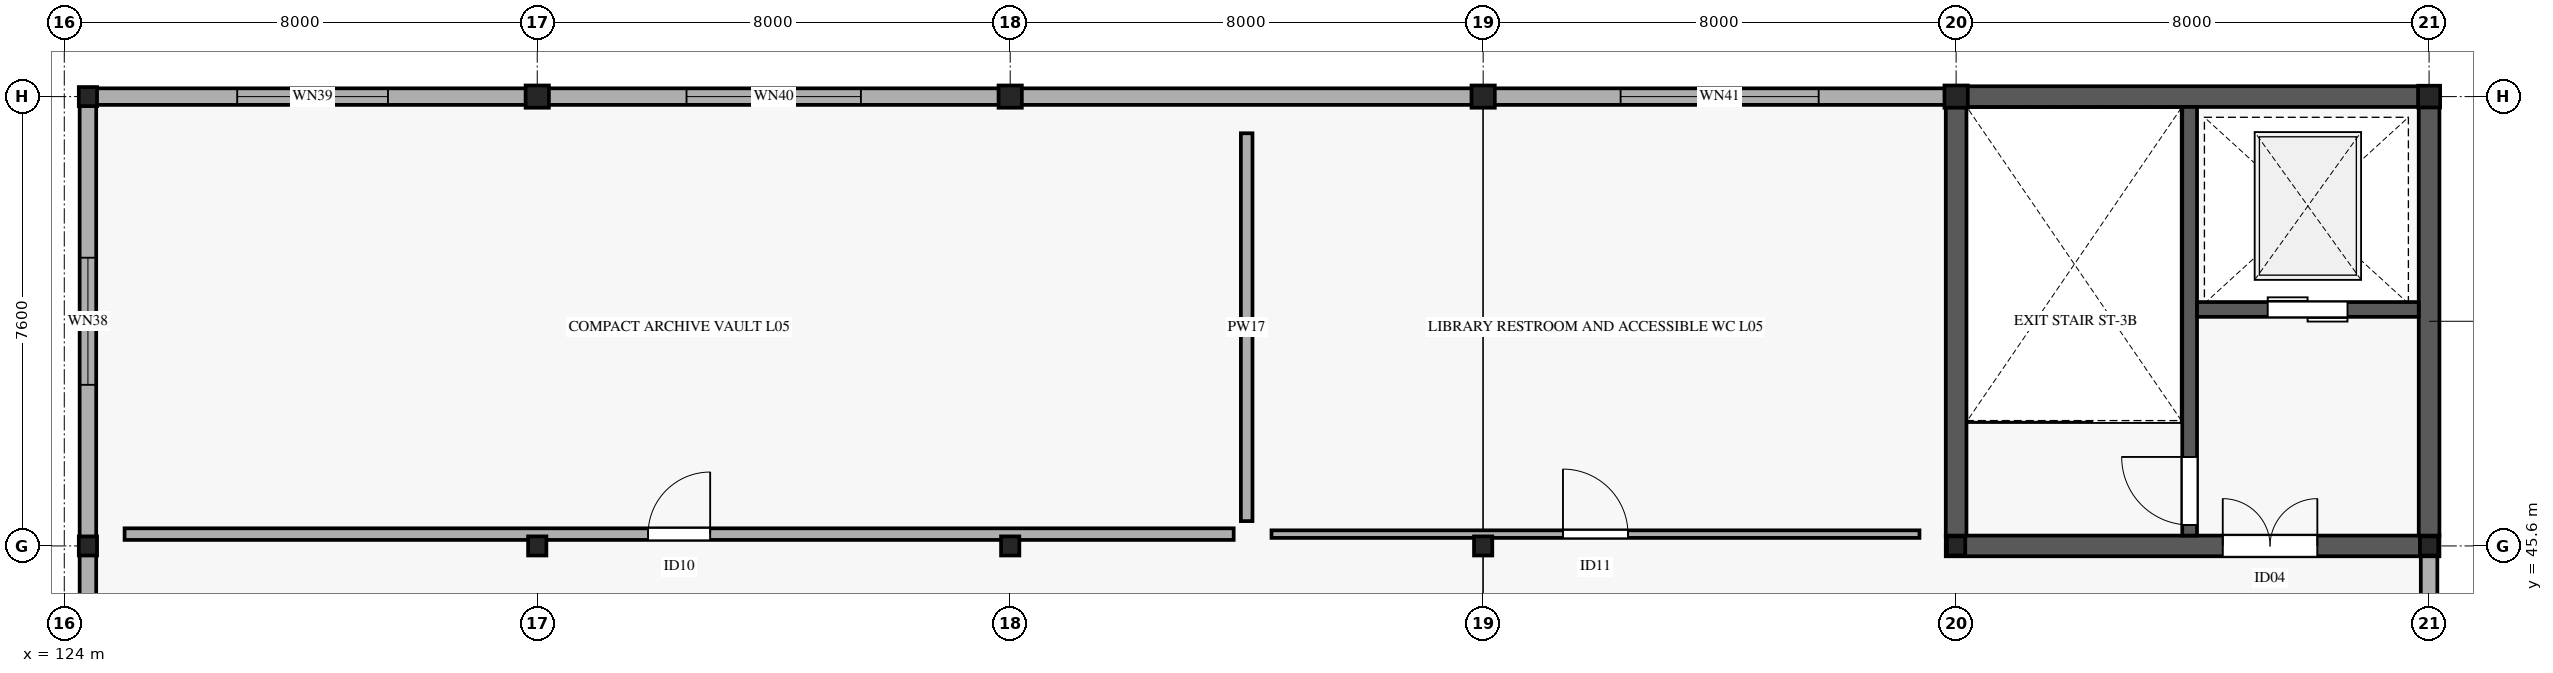
"""IFC4 building model, lengths in metres.
Left out: names, types, materials, properties, quantities, classifications, styles, units other than length and angle.
Written with IfcOpenShell. Run it as: python <this file> out.ifc"""

import sys

from ifc_helpers import new_model, si_unit, direction, frame, frame_2d, origin, origin_2d, place, context, subcontext, project, spatial, rectangle, i_section, extrude, element, fill, save


model = new_model("IFC4")
c1 = context("Model", 3, precision=1e-05, world=origin(), true_north=direction((0.0, 1.0)))
c2 = subcontext(c1, "Body", "Model", "MODEL_VIEW")
j1 = project(units=[si_unit("LENGTHUNIT", "METRE"), si_unit("PLANEANGLEUNIT", "RADIAN")], contexts=[c1])
p1 = place(None, origin())
s1 = spatial("IfcSite", under=j1, at=p1, CompositionType="ELEMENT")
p2 = place(p1, origin())
s2 = spatial("IfcBuilding", under=s1, at=p2, CompositionType="ELEMENT")
p3 = place(p2, frame((0.0, 0.0, 25.2)))
s3 = spatial("IfcBuildingStorey", under=s2, at=p3, CompositionType="ELEMENT", Elevation=25.2)
for number, where, z_axis, x_axis in (
    (1, (124.4, 45.6, 0.0), (0.0, 0.0, 1.0), (1.0, 0.0, 0.0)),
    (2, (124.4, 53.2, 0.0), (0.0, 0.0, 1.0), (1.0, 0.0, 0.0)),
    (3, (132.0, 45.6, 0.0), (0.0, 0.0, 1.0), (1.0, 0.0, 0.0)),
):
    element("IfcColumn", number, at=place(p3, frame(where, z_axis=z_axis, x_axis=x_axis)), inside=s3, PredefinedType="COLUMN", context=c2, shape_type="SweptSolid", body=[
        extrude(i_section(OverallWidth=0.309, OverallDepth=0.323, WebThickness=0.014, FlangeThickness=0.023, FilletRadius=0.015, at=origin_2d()), origin(), (0.0, 0.0, 1.0), 3.995),
    ])
p4 = place(p3, frame((132.0, 53.2, 0.0), z_axis=(0.0, 0.0, 1.0), x_axis=(1.0, 0.0, 0.0)))
e4 = element("IfcColumn", 4, at=p4, inside=s3, PredefinedType="COLUMN", context=c2, shape_type="SweptSolid", body=[
    extrude(i_section(OverallWidth=0.394, OverallDepth=0.376, WebThickness=0.017, FlangeThickness=0.028, FilletRadius=0.015, at=origin_2d()), origin(), (0.0, 0.0, 1.0), 3.995),
])
p5 = place(p3, frame((140.0, 45.6, 0.0), z_axis=(0.0, 0.0, 1.0), x_axis=(1.0, 0.0, 0.0)))
e5 = element("IfcColumn", 5, at=p5, inside=s3, PredefinedType="COLUMN", context=c2, shape_type="SweptSolid", body=[
    extrude(i_section(OverallWidth=0.309, OverallDepth=0.323, WebThickness=0.014, FlangeThickness=0.023, FilletRadius=0.015, at=origin_2d()), origin(), (0.0, 0.0, 1.0), 3.995),
])
p6 = place(p3, frame((140.0, 53.2, 0.0), z_axis=(0.0, 0.0, 1.0), x_axis=(1.0, 0.0, 0.0)))
e6 = element("IfcColumn", 6, at=p6, inside=s3, PredefinedType="COLUMN", context=c2, shape_type="SweptSolid", body=[
    extrude(i_section(OverallWidth=0.394, OverallDepth=0.376, WebThickness=0.017, FlangeThickness=0.028, FilletRadius=0.015, at=origin_2d()), origin(), (0.0, 0.0, 1.0), 3.995),
])
p7 = place(p3, frame((148.0, 45.6, 0.0), z_axis=(0.0, 0.0, 1.0), x_axis=(1.0, 0.0, 0.0)))
e7 = element("IfcColumn", 7, at=p7, inside=s3, PredefinedType="COLUMN", context=c2, shape_type="SweptSolid", body=[
    extrude(i_section(OverallWidth=0.309, OverallDepth=0.323, WebThickness=0.014, FlangeThickness=0.023, FilletRadius=0.015, at=origin_2d()), origin(), (0.0, 0.0, 1.0), 3.995),
])
p8 = place(p3, frame((148.0, 53.2, 0.0), z_axis=(0.0, 0.0, 1.0), x_axis=(1.0, 0.0, 0.0)))
e8 = element("IfcColumn", 8, at=p8, inside=s3, PredefinedType="COLUMN", context=c2, shape_type="SweptSolid", body=[
    extrude(i_section(OverallWidth=0.394, OverallDepth=0.376, WebThickness=0.017, FlangeThickness=0.028, FilletRadius=0.015, at=origin_2d()), origin(), (0.0, 0.0, 1.0), 3.995),
])
p9 = place(p3, frame((156.0, 45.6, 0.0), z_axis=(0.0, 0.0, 1.0), x_axis=(1.0, 0.0, 0.0)))
e9 = element("IfcColumn", 9, at=p9, inside=s3, PredefinedType="COLUMN", context=c2, shape_type="SweptSolid", body=[
    extrude(i_section(OverallWidth=0.309, OverallDepth=0.323, WebThickness=0.014, FlangeThickness=0.023, FilletRadius=0.015, at=origin_2d()), origin(), (0.0, 0.0, 1.0), 3.995),
])
p10 = place(p3, frame((156.0, 53.2, 0.0), z_axis=(0.0, 0.0, 1.0), x_axis=(1.0, 0.0, 0.0)))
e10 = element("IfcColumn", 10, at=p10, inside=s3, PredefinedType="COLUMN", context=c2, shape_type="SweptSolid", body=[
    extrude(i_section(OverallWidth=0.394, OverallDepth=0.376, WebThickness=0.017, FlangeThickness=0.028, FilletRadius=0.015, at=origin_2d()), origin(), (0.0, 0.0, 1.0), 3.995),
])
p11 = place(p3, frame((164.0, 45.6, 0.0), z_axis=(0.0, 0.0, 1.0), x_axis=(1.0, 0.0, 0.0)))
e11 = element("IfcColumn", 11, at=p11, inside=s3, PredefinedType="COLUMN", context=c2, shape_type="SweptSolid", body=[
    extrude(i_section(OverallWidth=0.309, OverallDepth=0.323, WebThickness=0.014, FlangeThickness=0.023, FilletRadius=0.015, at=origin_2d()), origin(), (0.0, 0.0, 1.0), 3.995),
])
p12 = place(p3, frame((164.0, 53.2, 0.0), z_axis=(0.0, 0.0, 1.0), x_axis=(1.0, 0.0, 0.0)))
e12 = element("IfcColumn", 12, at=p12, inside=s3, PredefinedType="COLUMN", context=c2, shape_type="SweptSolid", body=[
    extrude(i_section(OverallWidth=0.373, OverallDepth=0.368, WebThickness=0.015, FlangeThickness=0.024, FilletRadius=0.015, at=origin_2d()), origin(), (0.0, 0.0, 1.0), 3.995),
])
p13 = place(p3, frame((124.4, 37.98, 0.0), z_axis=(0.0, 0.0, 1.0), x_axis=(0.0, 1.0, 0.0)))
e13 = element("IfcWall", 13, at=p13, inside=s3, PredefinedType="STANDARD", context=c2, shape_type="SweptSolid", body=[
    extrude(rectangle(XDim=7.64, YDim=0.28, at=frame_2d((3.82, 0.0))), origin(), (0.0, 0.0, 1.0), 3.06),
])
p14 = place(p13, frame((2.895, 0.0, 0.75)))
e14 = element("IfcOpeningElement", 14, at=p14, cuts=e13, PredefinedType="OPENING", context=c2, shape_type="SweptSolid", body=[
    extrude(rectangle(XDim=1.85, YDim=1.9, at=frame_2d((0.925, 0.95))), frame((0.0, 0.15, 0.0), z_axis=(0.0, -1.0, 0.0), x_axis=(1.0, 0.0, 0.0)), (0.0, 0.0, 1.0), 0.3),
])
p15 = place(p3, frame((124.4, 45.58, 0.0), z_axis=(0.0, 0.0, 1.0), x_axis=(0.0, 1.0, 0.0)))
e15 = element("IfcWall", 15, at=p15, inside=s3, PredefinedType="STANDARD", context=c2, shape_type="SweptSolid", body=[
    extrude(rectangle(XDim=7.64, YDim=0.28, at=frame_2d((3.82, 0.0))), origin(), (0.0, 0.0, 1.0), 3.06),
])
p16 = place(p15, frame((2.745, 0.0, 0.75)))
e16 = element("IfcOpeningElement", 16, at=p16, cuts=e15, PredefinedType="OPENING", context=c2, shape_type="SweptSolid", body=[
    extrude(rectangle(XDim=2.15, YDim=1.9, at=frame_2d((1.075, 0.95))), frame((0.0, 0.15, 0.0), z_axis=(0.0, -1.0, 0.0), x_axis=(1.0, 0.0, 0.0)), (0.0, 0.0, 1.0), 0.3),
])
p17 = place(p3, frame((124.38, 53.2, 0.0), z_axis=(0.0, 0.0, 1.0), x_axis=(1.0, 0.0, 0.0)))
e17 = element("IfcWall", 17, at=p17, inside=s3, PredefinedType="STANDARD", context=c2, shape_type="SweptSolid", body=[
    extrude(rectangle(XDim=7.64, YDim=0.28, at=frame_2d((3.82, 0.0))), origin(), (0.0, 0.0, 1.0), 3.06),
])
p18 = place(p17, frame((2.545, 0.0, 0.75)))
e18 = element("IfcOpeningElement", 18, at=p18, cuts=e17, PredefinedType="OPENING", context=c2, shape_type="SweptSolid", body=[
    extrude(rectangle(XDim=2.55, YDim=1.9, at=frame_2d((1.275, 0.95))), frame((0.0, 0.15, 0.0), z_axis=(0.0, -1.0, 0.0), x_axis=(1.0, 0.0, 0.0)), (0.0, 0.0, 1.0), 0.3),
])
p19 = place(p3, frame((131.98, 53.2, 0.0), z_axis=(0.0, 0.0, 1.0), x_axis=(1.0, 0.0, 0.0)))
e19 = element("IfcWall", 19, at=p19, inside=s3, PredefinedType="STANDARD", context=c2, shape_type="SweptSolid", body=[
    extrude(rectangle(XDim=8.04, YDim=0.28, at=frame_2d((4.02, 0.0))), origin(), (0.0, 0.0, 1.0), 3.06),
])
p20 = place(p19, frame((2.545, 0.0, 0.75)))
e20 = element("IfcOpeningElement", 20, at=p20, cuts=e19, PredefinedType="OPENING", context=c2, shape_type="SweptSolid", body=[
    extrude(rectangle(XDim=2.95, YDim=1.9, at=frame_2d((1.475, 0.95))), frame((0.0, 0.15, 0.0), z_axis=(0.0, -1.0, 0.0), x_axis=(1.0, 0.0, 0.0)), (0.0, 0.0, 1.0), 0.3),
])
p21 = place(p3, frame((139.98, 53.2, 0.0), z_axis=(0.0, 0.0, 1.0), x_axis=(1.0, 0.0, 0.0)))
e21 = element("IfcWall", 21, at=p21, inside=s3, PredefinedType="STANDARD", context=c2, shape_type="SweptSolid", body=[
    extrude(rectangle(XDim=8.04, YDim=0.28, at=frame_2d((4.02, 0.0))), origin(), (0.0, 0.0, 1.0), 3.06),
])
p22 = place(p3, frame((147.98, 53.2, 0.0), z_axis=(0.0, 0.0, 1.0), x_axis=(1.0, 0.0, 0.0)))
e22 = element("IfcWall", 22, at=p22, inside=s3, PredefinedType="STANDARD", context=c2, shape_type="SweptSolid", body=[
    extrude(rectangle(XDim=8.04, YDim=0.28, at=frame_2d((4.02, 0.0))), origin(), (0.0, 0.0, 1.0), 3.06),
])
p23 = place(p22, frame((2.345, 0.0, 0.75)))
e23 = element("IfcOpeningElement", 23, at=p23, cuts=e22, PredefinedType="OPENING", context=c2, shape_type="SweptSolid", body=[
    extrude(rectangle(XDim=3.35, YDim=1.9, at=frame_2d((1.675, 0.95))), frame((0.0, 0.15, 0.0), z_axis=(0.0, -1.0, 0.0), x_axis=(1.0, 0.0, 0.0)), (0.0, 0.0, 1.0), 0.3),
])
p24 = place(p3, frame((164.0, 45.62, 0.0), z_axis=(0.0, 0.0, 1.0), x_axis=(0.0, -1.0, 0.0)))
e24 = element("IfcWall", 24, at=p24, inside=s3, PredefinedType="STANDARD", context=c2, shape_type="SweptSolid", body=[
    extrude(rectangle(XDim=7.64, YDim=0.28, at=frame_2d((3.82, 0.0))), origin(), (0.0, 0.0, 1.0), 3.06),
])
p25 = place(p24, frame((3.12, 0.0, 0.75)))
e25 = element("IfcOpeningElement", 25, at=p25, cuts=e24, PredefinedType="OPENING", context=c2, shape_type="SweptSolid", body=[
    extrude(rectangle(XDim=1.4, YDim=1.65, at=frame_2d((0.7, 0.825))), frame((0.0, 0.15, 0.0), z_axis=(0.0, -1.0, 0.0), x_axis=(1.0, 0.0, 0.0)), (0.0, 0.0, 1.0), 0.3),
])
p26 = place(p3, frame((155.825, 45.6, 0.0), z_axis=(0.0, 0.0, 1.0), x_axis=(1.0, 0.0, 0.0)))
e26 = element("IfcWall", 26, at=p26, inside=s3, PredefinedType="SHEAR", context=c2, shape_type="SweptSolid", body=[
    extrude(rectangle(XDim=8.35, YDim=0.35, at=frame_2d((4.175, 0.0))), origin(), (0.0, 0.0, 1.0), 3.99),
])
p27 = place(p26, frame((4.685, 0.0, 0.0)))
e27 = element("IfcOpeningElement", 27, at=p27, cuts=e26, PredefinedType="OPENING", context=c2, shape_type="SweptSolid", body=[
    extrude(rectangle(XDim=1.6, YDim=2.35, at=frame_2d((0.8, 1.175))), frame((0.0, 0.185, 0.0), z_axis=(0.0, -1.0, 0.0), x_axis=(1.0, 0.0, 0.0)), (0.0, 0.0, 1.0), 0.37),
])
p28 = place(p3, frame((155.825, 53.2, 0.0), z_axis=(0.0, 0.0, 1.0), x_axis=(1.0, 0.0, 0.0)))
e28 = element("IfcWall", 28, at=p28, inside=s3, PredefinedType="SHEAR", context=c2, shape_type="SweptSolid", body=[
    extrude(rectangle(XDim=8.35, YDim=0.35, at=frame_2d((4.175, 0.0))), origin(), (0.0, 0.0, 1.0), 3.99),
])
for number, where, z_axis, x_axis in (
    (29, (156.0, 45.775, 0.0), (0.0, 0.0, 1.0), (0.0, 1.0, 0.0)),
    (30, (164.0, 45.775, 0.0), (0.0, 0.0, 1.0), (0.0, 1.0, 0.0)),
):
    element("IfcWall", number, at=place(p3, frame(where, z_axis=z_axis, x_axis=x_axis)), inside=s3, PredefinedType="SHEAR", context=c2, shape_type="SweptSolid", body=[
        extrude(rectangle(XDim=7.25, YDim=0.35, at=frame_2d((3.625, 0.0))), origin(), (0.0, 0.0, 1.0), 3.99),
    ])
p29 = place(p3, frame((159.95, 45.775, 0.0), z_axis=(0.0, 0.0, 1.0), x_axis=(0.0, 1.0, 0.0)))
e31 = element("IfcWall", 31, at=p29, inside=s3, PredefinedType="SHEAR", context=c2, shape_type="SweptSolid", body=[
    extrude(rectangle(XDim=7.25, YDim=0.25, at=frame_2d((3.625, 0.0))), origin(), (0.0, 0.0, 1.0), 3.99),
])
p30 = place(p29, frame((0.18, 0.0, 0.0)))
e32 = element("IfcOpeningElement", 32, at=p30, cuts=e31, PredefinedType="OPENING", context=c2, shape_type="SweptSolid", body=[
    extrude(rectangle(XDim=1.15, YDim=2.2, at=frame_2d((0.575, 1.1))), frame((0.0, 0.135, 0.0), z_axis=(0.0, -1.0, 0.0), x_axis=(1.0, 0.0, 0.0)), (0.0, 0.0, 1.0), 0.27),
])
p31 = place(p3, frame((160.075, 49.6, 0.0), z_axis=(0.0, 0.0, 1.0), x_axis=(1.0, 0.0, 0.0)))
e33 = element("IfcWall", 33, at=p31, inside=s3, PredefinedType="SHEAR", context=c2, shape_type="SweptSolid", body=[
    extrude(rectangle(XDim=3.75, YDim=0.25, at=frame_2d((1.875, 0.0))), origin(), (0.0, 0.0, 1.0), 3.99),
])
p32 = place(p31, frame((1.195, 0.0, 0.0)))
e34 = element("IfcOpeningElement", 34, at=p32, cuts=e33, PredefinedType="OPENING", context=c2, shape_type="SweptSolid", body=[
    extrude(rectangle(XDim=1.35, YDim=2.2, at=frame_2d((0.675, 1.1))), frame((0.0, 0.135, 0.0), z_axis=(0.0, -1.0, 0.0), x_axis=(1.0, 0.0, 0.0)), (0.0, 0.0, 1.0), 0.27),
])
p33 = place(p3, frame((125.02, 45.8, 0.0), z_axis=(0.0, 0.0, 1.0), x_axis=(1.0, 0.0, 0.0)))
e35 = element("IfcWall", 35, at=p33, inside=s3, PredefinedType="PARTITIONING", context=c2, shape_type="SweptSolid", body=[
    extrude(rectangle(XDim=18.76, YDim=0.196, at=frame_2d((9.38, 0.0))), origin(), (0.0, 0.0, 1.0), 2.85),
])
p34 = place(p33, frame((8.855, 0.0, 0.0)))
e36 = element("IfcOpeningElement", 36, at=p34, cuts=e35, PredefinedType="OPENING", context=c2, shape_type="SweptSolid", body=[
    extrude(rectangle(XDim=1.05, YDim=2.15, at=frame_2d((0.525, 1.075))), frame((0.0, 0.108, 0.0), z_axis=(0.0, -1.0, 0.0), x_axis=(1.0, 0.0, 0.0)), (0.0, 0.0, 1.0), 0.216),
])
p35 = place(p3, frame((144.0, 46.02, 0.0), z_axis=(0.0, 0.0, 1.0), x_axis=(0.0, 1.0, 0.0)))
e37 = element("IfcWall", 37, at=p35, inside=s3, PredefinedType="PARTITIONING", context=c2, shape_type="SweptSolid", body=[
    extrude(rectangle(XDim=6.56, YDim=0.196, at=frame_2d((3.28, 0.0))), origin(), (0.0, 0.0, 1.0), 2.85),
])
p36 = place(p3, frame((144.42, 45.8, 0.0), z_axis=(0.0, 0.0, 1.0), x_axis=(1.0, 0.0, 0.0)))
e38 = element("IfcWall", 38, at=p36, inside=s3, PredefinedType="PARTITIONING", context=c2, shape_type="SweptSolid", body=[
    extrude(rectangle(XDim=10.96, YDim=0.128, at=frame_2d((5.48, 0.0))), origin(), (0.0, 0.0, 1.0), 2.85),
])
p37 = place(p36, frame((4.93, 0.0, 0.0)))
e39 = element("IfcOpeningElement", 39, at=p37, cuts=e38, PredefinedType="OPENING", context=c2, shape_type="SweptSolid", body=[
    extrude(rectangle(XDim=1.1, YDim=2.3, at=frame_2d((0.55, 1.15))), frame((0.0, 0.074, 0.0), z_axis=(0.0, -1.0, 0.0), x_axis=(1.0, 0.0, 0.0)), (0.0, 0.0, 1.0), 0.148),
])
p38 = place(p16, origin())
e40 = element("IfcWindow", 40, at=p38, inside=s3, PartitioningType="SINGLE_PANEL", PredefinedType="WINDOW", context=c2, shape_type="SweptSolid", body=[
    extrude(rectangle(XDim=2.15, YDim=1.9, at=frame_2d((1.075, 0.95))), frame((0.0, 0.03, 0.0), z_axis=(0.0, -1.0, 0.0), x_axis=(1.0, 0.0, 0.0)), (0.0, 0.0, 1.0), 0.06),
])
fill(e16, e40)
p39 = place(p18, origin())
e41 = element("IfcWindow", 41, at=p39, inside=s3, PartitioningType="SINGLE_PANEL", PredefinedType="WINDOW", context=c2, shape_type="SweptSolid", body=[
    extrude(rectangle(XDim=2.55, YDim=1.9, at=frame_2d((1.275, 0.95))), frame((0.0, 0.03, 0.0), z_axis=(0.0, -1.0, 0.0), x_axis=(1.0, 0.0, 0.0)), (0.0, 0.0, 1.0), 0.06),
])
fill(e18, e41)
p40 = place(p20, origin())
e42 = element("IfcWindow", 42, at=p40, inside=s3, PartitioningType="SINGLE_PANEL", PredefinedType="WINDOW", context=c2, shape_type="SweptSolid", body=[
    extrude(rectangle(XDim=2.95, YDim=1.9, at=frame_2d((1.475, 0.95))), frame((0.0, 0.03, 0.0), z_axis=(0.0, -1.0, 0.0), x_axis=(1.0, 0.0, 0.0)), (0.0, 0.0, 1.0), 0.06),
])
fill(e20, e42)
p41 = place(p23, origin())
e43 = element("IfcWindow", 43, at=p41, inside=s3, PartitioningType="SINGLE_PANEL", PredefinedType="WINDOW", context=c2, shape_type="SweptSolid", body=[
    extrude(rectangle(XDim=3.35, YDim=1.9, at=frame_2d((1.675, 0.95))), frame((0.0, 0.03, 0.0), z_axis=(0.0, -1.0, 0.0), x_axis=(1.0, 0.0, 0.0)), (0.0, 0.0, 1.0), 0.06),
])
fill(e23, e43)
p42 = place(p30, origin())
e44 = element("IfcDoor", 44, at=p42, inside=s3, OperationType="SINGLE_SWING_RIGHT", PredefinedType="DOOR", context=c2, shape_type="SweptSolid", body=[
    extrude(rectangle(XDim=1.15, YDim=2.2, at=frame_2d((0.575, 1.1))), frame((0.0, 0.025, 0.0), z_axis=(0.0, -1.0, 0.0), x_axis=(1.0, 0.0, 0.0)), (0.0, 0.0, 1.0), 0.05),
])
fill(e32, e44)
p43 = place(p27, origin())
e45 = element("IfcDoor", 45, at=p43, inside=s3, OperationType="DOUBLE_DOOR_SINGLE_SWING", PredefinedType="DOOR", context=c2, shape_type="SweptSolid", body=[
    extrude(rectangle(XDim=1.6, YDim=2.35, at=frame_2d((0.8, 1.175))), frame((0.0, 0.025, 0.0), z_axis=(0.0, -1.0, 0.0), x_axis=(1.0, 0.0, 0.0)), (0.0, 0.0, 1.0), 0.05),
])
fill(e27, e45)
p44 = place(p32, origin())
e46 = element("IfcDoor", 46, at=p44, inside=s3, OperationType="DOUBLE_DOOR_SLIDING", PredefinedType="DOOR", context=c2, shape_type="SweptSolid", body=[
    extrude(rectangle(XDim=1.35, YDim=2.2, at=frame_2d((0.675, 1.1))), frame((0.0, 0.025, 0.0), z_axis=(0.0, -1.0, 0.0), x_axis=(1.0, 0.0, 0.0)), (0.0, 0.0, 1.0), 0.05),
])
fill(e34, e46)
p45 = place(p34, origin())
e47 = element("IfcDoor", 47, at=p45, inside=s3, OperationType="SINGLE_SWING_RIGHT", PredefinedType="DOOR", context=c2, shape_type="SweptSolid", body=[
    extrude(rectangle(XDim=1.05, YDim=2.15, at=frame_2d((0.525, 1.075))), frame((0.0, 0.025, 0.0), z_axis=(0.0, -1.0, 0.0), x_axis=(1.0, 0.0, 0.0)), (0.0, 0.0, 1.0), 0.05),
])
fill(e36, e47)
p46 = place(p37, origin())
e48 = element("IfcDoor", 48, at=p46, inside=s3, OperationType="SINGLE_SWING_LEFT", PredefinedType="DOOR", context=c2, shape_type="SweptSolid", body=[
    extrude(rectangle(XDim=1.1, YDim=2.3, at=frame_2d((0.55, 1.15))), frame((0.0, 0.025, 0.0), z_axis=(0.0, -1.0, 0.0), x_axis=(1.0, 0.0, 0.0)), (0.0, 0.0, 1.0), 0.05),
])
fill(e39, e48)
save(model, sys.argv[1])
